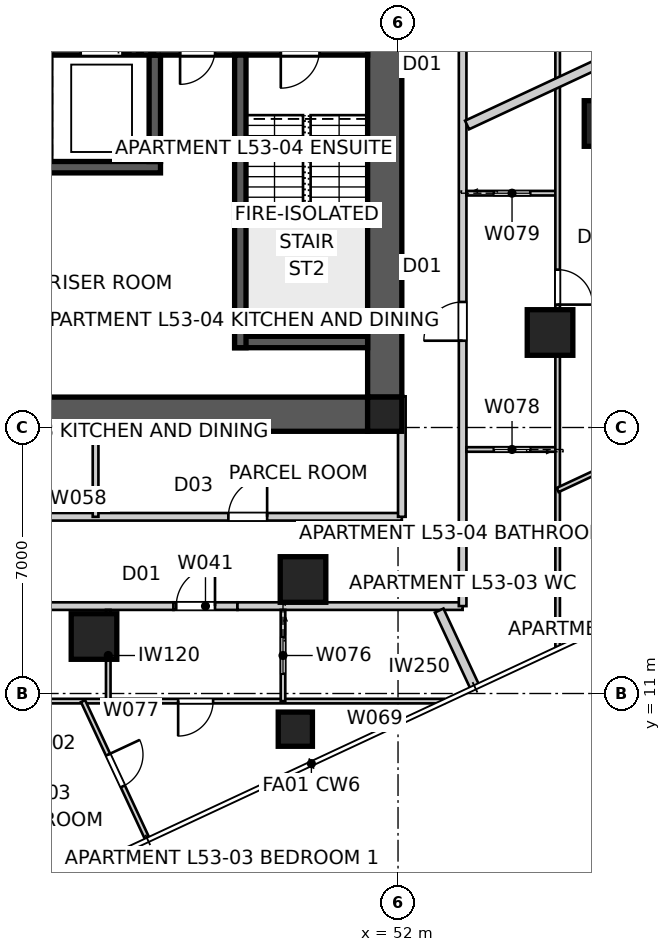
"""IFC4 building model, lengths in metres.
Left out: names, types, materials, properties, quantities, classifications, styles, units other than length and angle.
Written with IfcOpenShell. Run it as: python <this file> out.ifc"""

import sys

from ifc_helpers import new_model, si_unit, direction, frame, frame_2d, origin, origin_2d, place, context, subcontext, project, spatial, polyline, rectangle, outline, extrude, element, fill, save


model = new_model("IFC4")
c1 = context("Model", 3, precision=1e-05, world=origin(), true_north=direction((0.0, 1.0)))
c2 = subcontext(c1, "Body", "Model", "MODEL_VIEW")
j1 = project(units=[si_unit("LENGTHUNIT", "METRE"), si_unit("PLANEANGLEUNIT", "RADIAN")], contexts=[c1])
p1 = place(None, origin())
s1 = spatial("IfcSite", under=j1, at=p1, CompositionType="ELEMENT")
p2 = place(p1, origin())
s2 = spatial("IfcBuilding", under=s1, at=p2, CompositionType="ELEMENT")
p3 = place(p2, frame((0.0, 0.0, 193.0)))
s3 = spatial("IfcBuildingStorey", under=s2, at=p3, CompositionType="ELEMENT", Elevation=193.0)
p4 = place(p3, frame((51.2, 18.35, 0.0), z_axis=(0.0, 0.0, 1.0), x_axis=(-1.0, 0.0, 0.0)))
e1 = element("IfcWall", 1, at=p4, inside=s3, PredefinedType="SHEAR", context=c2, shape_type="SweptSolid", body=[
    extrude(outline(polyline([(0.0, -0.45), (22.4, -0.45), (22.4, -0.025), (22.85, -0.025), (22.85, 0.025), (22.4, 0.025), (22.4, 0.45), (0.0, 0.45), (0.0, 0.025), (-0.45, 0.025), (-0.45, -0.025), (0.0, -0.025), (0.0, -0.45)])), origin(), (0.0, 0.0, 1.0), 3.4),
])
p5 = place(p3, frame((51.65, 18.8, 0.0), z_axis=(0.0, 0.0, 1.0), x_axis=(0.0, 1.0, 0.0)))
e2 = element("IfcWall", 2, at=p5, inside=s3, PredefinedType="SHEAR", context=c2, shape_type="SweptSolid", body=[
    extrude(outline(polyline([(0.0, -0.45), (22.4, -0.45), (22.4, -0.025), (22.85, -0.025), (22.85, 0.025), (22.4, 0.025), (22.4, 0.45), (0.0, 0.45), (0.0, 0.025), (-0.45, 0.025), (-0.45, -0.025), (0.0, -0.025), (0.0, -0.45)])), origin(), (0.0, 0.0, 1.0), 3.4),
])
p6 = place(p5, frame((11.14, 0.0, 0.0)))
e3 = element("IfcOpeningElement", 3, at=p6, cuts=e2, PredefinedType="OPENING", context=c2, shape_type="SweptSolid", body=[
    extrude(rectangle(XDim=1.02, YDim=2.4, at=frame_2d((0.51, 1.2))), frame((0.0, 0.46, 0.0), z_axis=(0.0, -1.0, 0.0), x_axis=(1.0, 0.0, 0.0)), (0.0, 0.0, 1.0), 0.92),
])
p7 = place(p3, frame((51.2, 27.95, 0.0), z_axis=(0.0, 0.0, 1.0), x_axis=(-1.0, 0.0, 0.0)))
e4 = element("IfcWall", 4, at=p7, inside=s3, PredefinedType="SHEAR", context=c2, shape_type="SweptSolid", body=[
    extrude(rectangle(XDim=22.4, YDim=0.3, at=frame_2d((11.2, 0.0))), origin(), (0.0, 0.0, 1.0), 3.4),
])
p8 = place(p7, frame((19.04, 0.0, 0.0)))
e5 = element("IfcOpeningElement", 5, at=p8, cuts=e4, PredefinedType="OPENING", context=c2, shape_type="SweptSolid", body=[
    extrude(rectangle(XDim=0.92, YDim=2.1, at=frame_2d((0.46, 1.05))), frame((0.0, 0.16, 0.0), z_axis=(0.0, -1.0, 0.0), x_axis=(1.0, 0.0, 0.0)), (0.0, 0.0, 1.0), 0.32),
])
p9 = place(p7, frame((1.265, 0.0, 0.0)))
e6 = element("IfcOpeningElement", 6, at=p9, cuts=e4, PredefinedType="OPENING", context=c2, shape_type="SweptSolid", body=[
    extrude(rectangle(XDim=1.02, YDim=2.1, at=frame_2d((0.51, 1.05))), frame((0.0, 0.16, 0.0), z_axis=(0.0, -1.0, 0.0), x_axis=(1.0, 0.0, 0.0)), (0.0, 0.0, 1.0), 0.32),
])
p10 = place(p7, frame((4.015, 0.0, 0.0)))
e7 = element("IfcOpeningElement", 7, at=p10, cuts=e4, PredefinedType="OPENING", context=c2, shape_type="SweptSolid", body=[
    extrude(rectangle(XDim=0.92, YDim=2.1, at=frame_2d((0.46, 1.05))), frame((0.0, 0.16, 0.0), z_axis=(0.0, -1.0, 0.0), x_axis=(1.0, 0.0, 0.0)), (0.0, 0.0, 1.0), 0.32),
])
p11 = place(p7, frame((6.45, 0.0, 0.0)))
e8 = element("IfcOpeningElement", 8, at=p11, cuts=e4, PredefinedType="OPENING", context=c2, shape_type="SweptSolid", body=[
    extrude(rectangle(XDim=1.1, YDim=2.1, at=frame_2d((0.55, 1.05))), frame((0.0, 0.16, 0.0), z_axis=(0.0, -1.0, 0.0), x_axis=(1.0, 0.0, 0.0)), (0.0, 0.0, 1.0), 0.32),
])
p12 = place(p7, frame((9.25, 0.0, 0.0)))
e9 = element("IfcOpeningElement", 9, at=p12, cuts=e4, PredefinedType="OPENING", context=c2, shape_type="SweptSolid", body=[
    extrude(rectangle(XDim=1.1, YDim=2.1, at=frame_2d((0.55, 1.05))), frame((0.0, 0.16, 0.0), z_axis=(0.0, -1.0, 0.0), x_axis=(1.0, 0.0, 0.0)), (0.0, 0.0, 1.0), 0.32),
])
p13 = place(p7, frame((14.85, 0.0, 0.0)))
e10 = element("IfcOpeningElement", 10, at=p13, cuts=e4, PredefinedType="OPENING", context=c2, shape_type="SweptSolid", body=[
    extrude(rectangle(XDim=1.1, YDim=2.1, at=frame_2d((0.55, 1.05))), frame((0.0, 0.16, 0.0), z_axis=(0.0, -1.0, 0.0), x_axis=(1.0, 0.0, 0.0)), (0.0, 0.0, 1.0), 0.32),
])
p14 = place(p3, frame((45.75, 24.85, 0.0), z_axis=(0.0, 0.0, 1.0), x_axis=(-1.0, 0.0, 0.0)))
e11 = element("IfcWall", 11, at=p14, inside=s3, PredefinedType="SHEAR", context=c2, shape_type="SweptSolid", body=[
    extrude(rectangle(XDim=11.5, YDim=0.3, at=frame_2d((5.75, 0.0))), origin(), (0.0, 0.0, 1.0), 3.4),
])
p15 = place(p3, frame((45.6, 27.8, 0.0), z_axis=(0.0, 0.0, 1.0), x_axis=(0.0, -1.0, 0.0)))
e12 = element("IfcWall", 12, at=p15, inside=s3, PredefinedType="SHEAR", context=c2, shape_type="SweptSolid", body=[
    extrude(rectangle(XDim=2.8, YDim=0.3, at=frame_2d((1.4, 0.0))), origin(), (0.0, 0.0, 1.0), 3.4),
])
p16 = place(p3, frame((47.85, 27.8, 0.0), z_axis=(0.0, 0.0, 1.0), x_axis=(0.0, -1.0, 0.0)))
e13 = element("IfcWall", 13, at=p16, inside=s3, PredefinedType="SHEAR", context=c2, shape_type="SweptSolid", body=[
    extrude(rectangle(XDim=7.7, YDim=0.3, at=frame_2d((3.85, 0.0))), origin(), (0.0, 0.0, 1.0), 3.4),
])
p17 = place(p3, frame((51.2, 20.25, 0.0), z_axis=(0.0, 0.0, 1.0), x_axis=(-1.0, 0.0, 0.0)))
e14 = element("IfcWall", 14, at=p17, inside=s3, PredefinedType="SHEAR", context=c2, shape_type="SweptSolid", body=[
    extrude(rectangle(XDim=3.5, YDim=0.3, at=frame_2d((1.75, 0.0))), origin(), (0.0, 0.0, 1.0), 3.4),
])
for number, where, z_axis, x_axis in (
    (15, (51.65, 18.35, 0.0), (0.0, 0.0, 1.0), (1.0, 0.0, 0.0)),
    (16, (49.298, 10.061, 0.0), (0.0, 0.0, 1.0), (1.0, 0.0, 0.0)),
):
    element("IfcColumn", number, at=place(p3, frame(where, z_axis=z_axis, x_axis=x_axis)), inside=s3, PredefinedType="COLUMN", context=c2, shape_type="SweptSolid", body=[
        extrude(rectangle(XDim=0.9, YDim=0.9, at=origin_2d()), origin(), (0.0, 0.0, 1.0), 3.4),
    ])
for number, where, z_axis, x_axis in (
    (17, (57.5, 26.0, 0.0), (0.0, 0.0, 1.0), (1.0, 0.0, 0.0)),
    (18, (44.0, 12.5, 0.0), (0.0, 0.0, 1.0), (1.0, 0.0, 0.0)),
    (19, (49.5, 14.0, 0.0), (0.0, 0.0, 1.0), (1.0, 0.0, 0.0)),
    (20, (56.0, 20.5, 0.0), (0.0, 0.0, 1.0), (1.0, 0.0, 0.0)),
):
    element("IfcColumn", number, at=place(p3, frame(where, z_axis=z_axis, x_axis=x_axis)), inside=s3, PredefinedType="COLUMN", context=c2, shape_type="SweptSolid", body=[
        extrude(rectangle(XDim=1.2, YDim=1.2, at=origin_2d()), origin(), (0.0, 0.0, 1.0), 3.4),
    ])
p18 = place(p3, frame((33.908, 13.3, 0.0), z_axis=(0.0, 0.0, 1.0), x_axis=(1.0, 0.0, 0.0)))
e21 = element("IfcWall", 21, at=p18, inside=s3, PredefinedType="PARTITIONING", context=c2, shape_type="SweptSolid", body=[
    extrude(rectangle(XDim=12.183, YDim=0.2, at=frame_2d((6.092, 0.0))), origin(), (0.0, 0.0, 1.0), 3.25),
])
p19 = place(p3, frame((46.092, 13.3, 0.0), z_axis=(0.0, 0.0, 1.0), x_axis=(1.0, 0.0, 0.0)))
e22 = element("IfcWall", 22, at=p19, inside=s3, PredefinedType="PARTITIONING", context=c2, shape_type="SweptSolid", body=[
    extrude(rectangle(XDim=1.684, YDim=0.2, at=frame_2d((0.842, 0.0))), origin(), (0.0, 0.0, 1.0), 2.55),
])
p20 = place(p19, frame((0.073, 0.0, 0.0)))
e23 = element("IfcOpeningElement", 23, at=p20, cuts=e22, PredefinedType="OPENING", context=c2, shape_type="SweptSolid", body=[
    extrude(rectangle(XDim=1.02, YDim=2.34, at=frame_2d((0.51, 1.17))), frame((0.0, 0.11, 0.0), z_axis=(0.0, -1.0, 0.0), x_axis=(1.0, 0.0, 0.0)), (0.0, 0.0, 1.0), 0.22),
])
p21 = place(p3, frame((47.775, 13.3, 0.0), z_axis=(0.0, 0.0, 1.0), x_axis=(1.0, 0.0, 0.0)))
e24 = element("IfcWall", 24, at=p21, inside=s3, PredefinedType="PARTITIONING", context=c2, shape_type="SweptSolid", body=[
    extrude(rectangle(XDim=5.925, YDim=0.2, at=frame_2d((2.962, 0.0))), origin(), (0.0, 0.0, 1.0), 3.25),
])
p22 = place(p3, frame((53.7, 13.3, 0.0), z_axis=(0.0, 0.0, 1.0), x_axis=(0.0, 1.0, 0.0)))
e25 = element("IfcWall", 25, at=p22, inside=s3, PredefinedType="PARTITIONING", context=c2, shape_type="SweptSolid", body=[
    extrude(rectangle(XDim=33.8, YDim=0.2, at=frame_2d((16.9, 0.0))), origin(), (0.0, 0.0, 1.0), 3.25),
])
p23 = place(p22, frame((6.984, 0.0, 0.0)))
e26 = element("IfcOpeningElement", 26, at=p23, cuts=e25, PredefinedType="OPENING", context=c2, shape_type="SweptSolid", body=[
    extrude(rectangle(XDim=1.02, YDim=2.34, at=frame_2d((0.51, 1.17))), frame((0.0, 0.11, 0.0), z_axis=(0.0, -1.0, 0.0), x_axis=(1.0, 0.0, 0.0)), (0.0, 0.0, 1.0), 0.22),
])
p24 = place(p22, frame((29.648, 0.0, 0.0)))
e27 = element("IfcOpeningElement", 27, at=p24, cuts=e25, PredefinedType="OPENING", context=c2, shape_type="SweptSolid", body=[
    extrude(rectangle(XDim=1.02, YDim=2.34, at=frame_2d((0.51, 1.17))), frame((0.0, 0.11, 0.0), z_axis=(0.0, -1.0, 0.0), x_axis=(1.0, 0.0, 0.0)), (0.0, 0.0, 1.0), 0.22),
])
p25 = place(p22, frame((15.16, 0.0, 0.0)))
e28 = element("IfcOpeningElement", 28, at=p25, cuts=e25, PredefinedType="OPENING", context=c2, shape_type="SweptSolid", body=[
    extrude(rectangle(XDim=1.02, YDim=2.34, at=frame_2d((0.51, 1.17))), frame((0.0, 0.11, 0.0), z_axis=(0.0, -1.0, 0.0), x_axis=(1.0, 0.0, 0.0)), (0.0, 0.0, 1.0), 0.22),
])
p26 = place(p3, frame((54.025, 11.162, 0.0), z_axis=(0.0, 0.0, 1.0), x_axis=(-0.422609736898, 0.906311762187, 0.0)))
e29 = element("IfcWall", 29, at=p26, inside=s3, PredefinedType="PARTITIONING", context=c2, shape_type="SweptSolid", body=[
    extrude(rectangle(XDim=2.23, YDim=0.25, at=frame_2d((1.115, 0.0))), origin(), (0.0, 0.0, 1.0), 3.25),
])
p27 = place(p3, frame((64.86, 31.11, 0.0), z_axis=(0.0, 0.0, 1.0), x_axis=(-0.906303906082, -0.422626584374, 0.0)))
e30 = element("IfcWall", 30, at=p27, inside=s3, PredefinedType="PARTITIONING", context=c2, shape_type="SweptSolid", body=[
    extrude(rectangle(XDim=12.185, YDim=0.25, at=frame_2d((6.092, 0.0))), origin(), (0.0, 0.0, 1.0), 3.25),
])
p28 = place(p3, frame((27.9, 15.65, 0.0), z_axis=(0.0, 0.0, 1.0), x_axis=(1.0, 0.0, 0.0)))
e31 = element("IfcWall", 31, at=p28, inside=s3, PredefinedType="PARTITIONING", context=c2, shape_type="SweptSolid", body=[
    extrude(rectangle(XDim=24.2, YDim=0.2, at=frame_2d((12.1, 0.0))), origin(), (0.0, 0.0, 1.0), 3.25),
])
p29 = place(p28, frame((10.743, 0.0, 0.0)))
e32 = element("IfcOpeningElement", 32, at=p29, cuts=e31, PredefinedType="OPENING", context=c2, shape_type="SweptSolid", body=[
    extrude(rectangle(XDim=1.02, YDim=2.1, at=frame_2d((0.51, 1.05))), frame((0.0, 0.11, 0.0), z_axis=(0.0, -1.0, 0.0), x_axis=(1.0, 0.0, 0.0)), (0.0, 0.0, 1.0), 0.22),
])
p30 = place(p28, frame((19.636, 0.0, 0.0)))
e33 = element("IfcOpeningElement", 33, at=p30, cuts=e31, PredefinedType="OPENING", context=c2, shape_type="SweptSolid", body=[
    extrude(rectangle(XDim=1.02, YDim=2.1, at=frame_2d((0.51, 1.05))), frame((0.0, 0.11, 0.0), z_axis=(0.0, -1.0, 0.0), x_axis=(1.0, 0.0, 0.0)), (0.0, 0.0, 1.0), 0.22),
])
p31 = place(p28, frame((3.297, 0.0, 0.0)))
e34 = element("IfcOpeningElement", 34, at=p31, cuts=e31, PredefinedType="OPENING", context=c2, shape_type="SweptSolid", body=[
    extrude(rectangle(XDim=1.02, YDim=2.1, at=frame_2d((0.51, 1.05))), frame((0.0, 0.11, 0.0), z_axis=(0.0, -1.0, 0.0), x_axis=(1.0, 0.0, 0.0)), (0.0, 0.0, 1.0), 0.22),
])
p32 = place(p3, frame((52.1, 15.65, 0.0), z_axis=(0.0, 0.0, 1.0), x_axis=(0.0, 1.0, 0.0)))
e35 = element("IfcWall", 35, at=p32, inside=s3, PredefinedType="PARTITIONING", context=c2, shape_type="SweptSolid", body=[
    extrude(rectangle(XDim=3.17, YDim=0.2, at=frame_2d((1.585, 0.0))), origin(), (0.0, 0.0, 1.0), 3.25),
])
p33 = place(p3, frame((44.042, 15.65, 0.0), z_axis=(0.0, 0.0, 1.0), x_axis=(0.0, 1.0, 0.0)))
e36 = element("IfcWall", 36, at=p33, inside=s3, PredefinedType="SOLIDWALL", context=c2, shape_type="SweptSolid", body=[
    extrude(rectangle(XDim=2.25, YDim=0.15, at=frame_2d((1.125, 0.0))), origin(), (0.0, 0.0, 1.0), 3.25),
])
p34 = place(p3, frame((53.208, 10.8, 0.0), z_axis=(0.0, 0.0, 1.0), x_axis=(-1.0, 0.0, 0.0)))
e37 = element("IfcWall", 37, at=p34, inside=s3, PredefinedType="PARTITIONING", context=c2, shape_type="SweptSolid", body=[
    extrude(rectangle(XDim=29.593, YDim=0.12, at=frame_2d((14.796, 0.0))), origin(), (0.0, 0.0, 1.0), 3.25),
])
p35 = place(p34, frame((6.074, 0.0, 0.0)))
e38 = element("IfcOpeningElement", 38, at=p35, cuts=e37, PredefinedType="OPENING", context=c2, shape_type="SweptSolid", body=[
    extrude(rectangle(XDim=0.92, YDim=2.34, at=frame_2d((0.46, 1.17))), frame((0.0, 0.07, 0.0), z_axis=(0.0, -1.0, 0.0), x_axis=(1.0, 0.0, 0.0)), (0.0, 0.0, 1.0), 0.14),
])
p36 = place(p34, frame((25.566, 0.0, 0.0)))
e39 = element("IfcOpeningElement", 39, at=p36, cuts=e37, PredefinedType="OPENING", context=c2, shape_type="SweptSolid", body=[
    extrude(rectangle(XDim=0.92, YDim=2.34, at=frame_2d((0.46, 1.17))), frame((0.0, 0.07, 0.0), z_axis=(0.0, -1.0, 0.0), x_axis=(1.0, 0.0, 0.0)), (0.0, 0.0, 1.0), 0.14),
])
p37 = place(p34, frame((18.515, 0.0, 0.0)))
e40 = element("IfcOpeningElement", 40, at=p37, cuts=e37, PredefinedType="OPENING", context=c2, shape_type="SweptSolid", body=[
    extrude(rectangle(XDim=0.96, YDim=2.1, at=frame_2d((0.48, 1.05))), frame((0.0, 0.07, 0.0), z_axis=(0.0, -1.0, 0.0), x_axis=(1.0, 0.0, 0.0)), (0.0, 0.0, 1.0), 0.14),
])
p38 = place(p34, frame((15.493, 0.0, 0.0)))
e41 = element("IfcOpeningElement", 41, at=p38, cuts=e37, PredefinedType="OPENING", context=c2, shape_type="SweptSolid", body=[
    extrude(rectangle(XDim=0.96, YDim=2.1, at=frame_2d((0.48, 1.05))), frame((0.0, 0.07, 0.0), z_axis=(0.0, -1.0, 0.0), x_axis=(1.0, 0.0, 0.0)), (0.0, 0.0, 1.0), 0.14),
])
p39 = place(p34, frame((11.609, 0.0, 0.0)))
e42 = element("IfcOpeningElement", 42, at=p39, cuts=e37, PredefinedType="OPENING", context=c2, shape_type="SweptSolid", body=[
    extrude(rectangle(XDim=0.96, YDim=2.1, at=frame_2d((0.48, 1.05))), frame((0.0, 0.07, 0.0), z_axis=(0.0, -1.0, 0.0), x_axis=(1.0, 0.0, 0.0)), (0.0, 0.0, 1.0), 0.14),
])
p40 = place(p3, frame((44.375, 10.8, 0.0), z_axis=(0.0, 0.0, 1.0), x_axis=(0.0, 1.0, 0.0)))
e43 = element("IfcWall", 43, at=p40, inside=s3, PredefinedType="PARTITIONING", context=c2, shape_type="SweptSolid", body=[
    extrude(rectangle(XDim=2.4, YDim=0.12, at=frame_2d((1.2, 0.0))), origin(), (0.0, 0.0, 1.0), 3.25),
])
p41 = place(p3, frame((48.973, 13.2, 0.0), z_axis=(0.0, 0.0, 1.0), x_axis=(0.0, -1.0, 0.0)))
e44 = element("IfcWall", 44, at=p41, inside=s3, PredefinedType="PARTITIONING", context=c2, shape_type="SweptSolid", body=[
    extrude(rectangle(XDim=2.4, YDim=0.12, at=frame_2d((1.2, 0.0))), origin(), (0.0, 0.0, 1.0), 3.25),
])
p42 = place(p41, frame((0.72, 0.0, 0.0)))
e45 = element("IfcOpeningElement", 45, at=p42, cuts=e44, PredefinedType="OPENING", context=c2, shape_type="SweptSolid", body=[
    extrude(rectangle(XDim=0.96, YDim=2.1, at=frame_2d((0.48, 1.05))), frame((0.0, 0.07, 0.0), z_axis=(0.0, -1.0, 0.0), x_axis=(1.0, 0.0, 0.0)), (0.0, 0.0, 1.0), 0.14),
])
p43 = place(p3, frame((43.712, 10.8, 0.0), z_axis=(0.0, 0.0, 1.0), x_axis=(0.422620823304, -0.906306592556, 0.0)))
e46 = element("IfcWall", 46, at=p43, inside=s3, PredefinedType="PARTITIONING", context=c2, shape_type="SweptSolid", body=[
    extrude(rectangle(XDim=3.99, YDim=0.12, at=frame_2d((1.995, 0.0))), origin(), (0.0, 0.0, 1.0), 3.25),
])
p44 = place(p43, frame((1.555, 0.0, 0.0)))
e47 = element("IfcOpeningElement", 47, at=p44, cuts=e46, PredefinedType="OPENING", context=c2, shape_type="SweptSolid", body=[
    extrude(rectangle(XDim=0.92, YDim=2.34, at=frame_2d((0.46, 1.17))), frame((0.0, 0.07, 0.0), z_axis=(0.0, -1.0, 0.0), x_axis=(1.0, 0.0, 0.0)), (0.0, 0.0, 1.0), 0.14),
])
p45 = place(p3, frame((56.2, 17.422, 0.0), z_axis=(0.0, 0.0, 1.0), x_axis=(-1.0, 0.0, 0.0)))
e48 = element("IfcWall", 48, at=p45, inside=s3, PredefinedType="PARTITIONING", context=c2, shape_type="SweptSolid", body=[
    extrude(rectangle(XDim=2.4, YDim=0.12, at=frame_2d((1.2, 0.0))), origin(), (0.0, 0.0, 1.0), 3.25),
])
p46 = place(p45, frame((0.72, 0.0, 0.0)))
e49 = element("IfcOpeningElement", 49, at=p46, cuts=e48, PredefinedType="OPENING", context=c2, shape_type="SweptSolid", body=[
    extrude(rectangle(XDim=0.96, YDim=2.1, at=frame_2d((0.48, 1.05))), frame((0.0, 0.07, 0.0), z_axis=(0.0, -1.0, 0.0), x_axis=(1.0, 0.0, 0.0)), (0.0, 0.0, 1.0), 0.14),
])
p47 = place(p3, frame((53.8, 24.166, 0.0), z_axis=(0.0, 0.0, 1.0), x_axis=(1.0, 0.0, 0.0)))
e50 = element("IfcWall", 50, at=p47, inside=s3, PredefinedType="PARTITIONING", context=c2, shape_type="SweptSolid", body=[
    extrude(rectangle(XDim=2.4, YDim=0.12, at=frame_2d((1.2, 0.0))), origin(), (0.0, 0.0, 1.0), 2.796),
])
p48 = place(p47, frame((0.72, 0.0, 0.0)))
e51 = element("IfcOpeningElement", 51, at=p48, cuts=e50, PredefinedType="OPENING", context=c2, shape_type="SweptSolid", body=[
    extrude(rectangle(XDim=0.96, YDim=2.1, at=frame_2d((0.48, 1.05))), frame((0.0, 0.07, 0.0), z_axis=(0.0, -1.0, 0.0), x_axis=(1.0, 0.0, 0.0)), (0.0, 0.0, 1.0), 0.14),
])
p49 = place(p3, frame((56.2, 49.642, 0.0), z_axis=(0.0, 0.0, 1.0), x_axis=(0.0, -1.0, 0.0)))
e52 = element("IfcWall", 52, at=p49, inside=s3, PredefinedType="PARTITIONING", context=c2, shape_type="SweptSolid", body=[
    extrude(rectangle(XDim=37.421, YDim=0.12, at=frame_2d((18.71, 0.0))), origin(), (0.0, 0.0, 1.0), 2.55),
])
p50 = place(p49, frame((27.488, 0.0, 0.0)))
e53 = element("IfcOpeningElement", 53, at=p50, cuts=e52, PredefinedType="OPENING", context=c2, shape_type="SweptSolid", body=[
    extrude(rectangle(XDim=0.92, YDim=2.34, at=frame_2d((0.46, 1.17))), frame((0.0, 0.07, 0.0), z_axis=(0.0, -1.0, 0.0), x_axis=(1.0, 0.0, 0.0)), (0.0, 0.0, 1.0), 0.14),
])
p51 = place(p49, frame((5.08, 0.0, 0.0)))
e54 = element("IfcOpeningElement", 54, at=p51, cuts=e52, PredefinedType="OPENING", context=c2, shape_type="SweptSolid", body=[
    extrude(rectangle(XDim=0.92, YDim=2.34, at=frame_2d((0.46, 1.17))), frame((0.0, 0.07, 0.0), z_axis=(0.0, -1.0, 0.0), x_axis=(1.0, 0.0, 0.0)), (0.0, 0.0, 1.0), 0.14),
])
p52 = place(p49, frame((19.592, 0.0, 0.0)))
e55 = element("IfcOpeningElement", 55, at=p52, cuts=e52, PredefinedType="OPENING", context=c2, shape_type="SweptSolid", body=[
    extrude(rectangle(XDim=0.92, YDim=2.34, at=frame_2d((0.46, 1.17))), frame((0.0, 0.07, 0.0), z_axis=(0.0, -1.0, 0.0), x_axis=(1.0, 0.0, 0.0)), (0.0, 0.0, 1.0), 0.14),
])
p53 = place(p3, frame((61.035, 18.609, 0.0), z_axis=(0.0, 0.0, 1.0), x_axis=(-0.906312880264, -0.422607339108, 0.0)))
e56 = element("IfcWall", 56, at=p53, inside=s3, PredefinedType="PARTITIONING", context=c2, shape_type="SweptSolid", body=[
    extrude(rectangle(XDim=5.334, YDim=0.12, at=frame_2d((2.667, 0.0))), origin(), (0.0, 0.0, 1.0), 3.25),
])
p54 = place(p53, frame((2.207, 0.0, 0.0)))
e57 = element("IfcOpeningElement", 57, at=p54, cuts=e56, PredefinedType="OPENING", context=c2, shape_type="SweptSolid", body=[
    extrude(rectangle(XDim=0.92, YDim=2.34, at=frame_2d((0.46, 1.17))), frame((0.0, 0.07, 0.0), z_axis=(0.0, -1.0, 0.0), x_axis=(1.0, 0.0, 0.0)), (0.0, 0.0, 1.0), 0.14),
])
p55 = place(p30, origin())
e58 = element("IfcDoor", 58, at=p55, inside=s3, OperationType="SINGLE_SWING_RIGHT", PredefinedType="DOOR", context=c2, shape_type="SweptSolid", body=[
    extrude(rectangle(XDim=1.02, YDim=2.1, at=frame_2d((0.51, 1.05))), frame((0.0, 0.025, 0.0), z_axis=(0.0, -1.0, 0.0), x_axis=(1.0, 0.0, 0.0)), (0.0, 0.0, 1.0), 0.05),
])
fill(e33, e58)
p56 = place(p23, origin())
e59 = element("IfcDoor", 59, at=p56, inside=s3, OperationType="SINGLE_SWING_LEFT", PredefinedType="DOOR", context=c2, shape_type="SweptSolid", body=[
    extrude(rectangle(XDim=1.02, YDim=2.34, at=frame_2d((0.51, 1.17))), frame((0.0, 0.025, 0.0), z_axis=(0.0, -1.0, 0.0), x_axis=(1.0, 0.0, 0.0)), (0.0, 0.0, 1.0), 0.05),
])
fill(e26, e59)
p57 = place(p20, origin())
e60 = element("IfcDoor", 60, at=p57, inside=s3, OperationType="SINGLE_SWING_RIGHT", PredefinedType="DOOR", context=c2, shape_type="SweptSolid", body=[
    extrude(rectangle(XDim=1.02, YDim=2.34, at=frame_2d((0.51, 1.17))), frame((0.0, 0.025, 0.0), z_axis=(0.0, -1.0, 0.0), x_axis=(1.0, 0.0, 0.0)), (0.0, 0.0, 1.0), 0.05),
])
fill(e23, e60)
p58 = place(p50, origin())
e61 = element("IfcDoor", 61, at=p58, inside=s3, OperationType="SINGLE_SWING_RIGHT", PredefinedType="DOOR", context=c2, shape_type="SweptSolid", body=[
    extrude(rectangle(XDim=0.92, YDim=2.34, at=frame_2d((0.46, 1.17))), frame((0.0, 0.025, 0.0), z_axis=(0.0, -1.0, 0.0), x_axis=(1.0, 0.0, 0.0)), (0.0, 0.0, 1.0), 0.05),
])
fill(e53, e61)
p59 = place(p46, origin())
e62 = element("IfcDoor", 62, at=p59, inside=s3, OperationType="SLIDING_TO_LEFT", PredefinedType="DOOR", context=c2, shape_type="SweptSolid", body=[
    extrude(rectangle(XDim=0.96, YDim=2.1, at=frame_2d((0.48, 1.05))), frame((0.0, 0.025, 0.0), z_axis=(0.0, -1.0, 0.0), x_axis=(1.0, 0.0, 0.0)), (0.0, 0.0, 1.0), 0.05),
])
fill(e49, e62)
p60 = place(p48, origin())
e63 = element("IfcDoor", 63, at=p60, inside=s3, OperationType="SLIDING_TO_LEFT", PredefinedType="DOOR", context=c2, shape_type="SweptSolid", body=[
    extrude(rectangle(XDim=0.96, YDim=2.1, at=frame_2d((0.48, 1.05))), frame((0.0, 0.025, 0.0), z_axis=(0.0, -1.0, 0.0), x_axis=(1.0, 0.0, 0.0)), (0.0, 0.0, 1.0), 0.05),
])
fill(e51, e63)
p61 = place(p35, origin())
e64 = element("IfcDoor", 64, at=p61, inside=s3, OperationType="SINGLE_SWING_RIGHT", PredefinedType="DOOR", context=c2, shape_type="SweptSolid", body=[
    extrude(rectangle(XDim=0.92, YDim=2.34, at=frame_2d((0.46, 1.17))), frame((0.0, 0.025, 0.0), z_axis=(0.0, -1.0, 0.0), x_axis=(1.0, 0.0, 0.0)), (0.0, 0.0, 1.0), 0.05),
])
fill(e38, e64)
p62 = place(p42, origin())
e65 = element("IfcDoor", 65, at=p62, inside=s3, OperationType="SLIDING_TO_LEFT", PredefinedType="DOOR", context=c2, shape_type="SweptSolid", body=[
    extrude(rectangle(XDim=0.96, YDim=2.1, at=frame_2d((0.48, 1.05))), frame((0.0, 0.025, 0.0), z_axis=(0.0, -1.0, 0.0), x_axis=(1.0, 0.0, 0.0)), (0.0, 0.0, 1.0), 0.05),
])
fill(e45, e65)
p63 = place(p44, origin())
e66 = element("IfcDoor", 66, at=p63, inside=s3, OperationType="SINGLE_SWING_LEFT", PredefinedType="DOOR", context=c2, shape_type="SweptSolid", body=[
    extrude(rectangle(XDim=0.92, YDim=2.34, at=frame_2d((0.46, 1.17))), frame((0.0, 0.025, 0.0), z_axis=(0.0, -1.0, 0.0), x_axis=(1.0, 0.0, 0.0)), (0.0, 0.0, 1.0), 0.05),
])
fill(e47, e66)
save(model, sys.argv[1])
